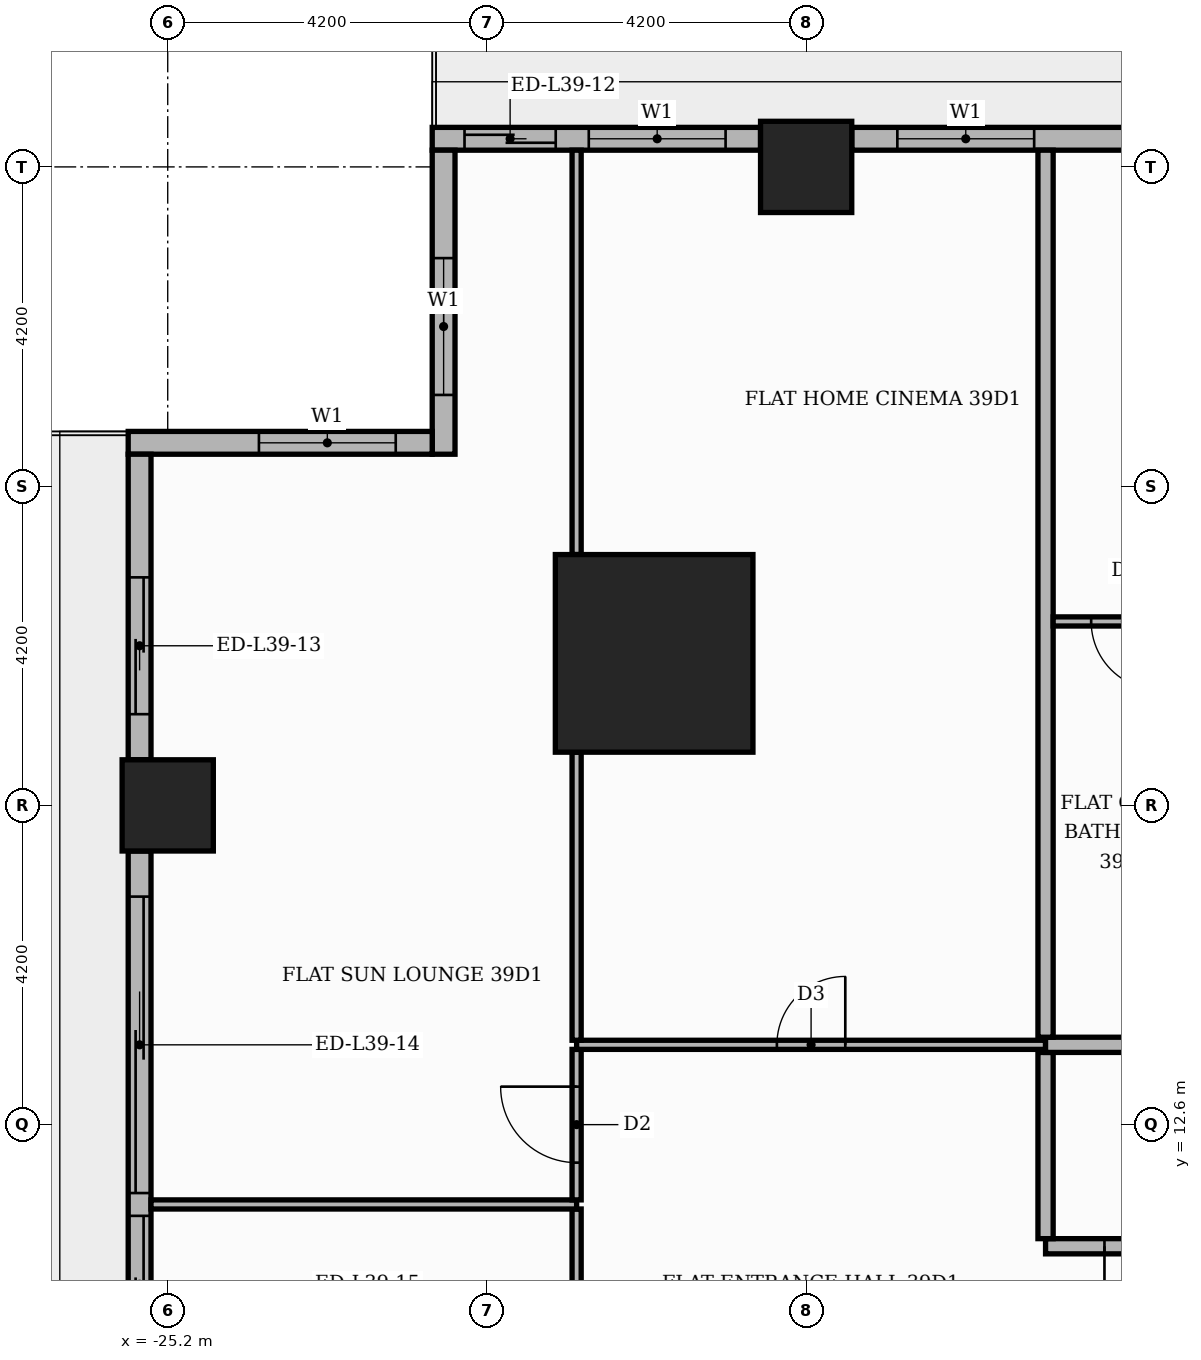
"""IFC4 building model, lengths in metres.
Left out: names, types, materials, properties, quantities, classifications, styles, units other than length and angle.
Written with IfcOpenShell. Run it as: python <this file> out.ifc"""

import sys

from ifc_helpers import new_model, si_unit, direction, frame, frame_2d, origin, origin_2d, place, context, subcontext, project, spatial, rectangle, extrude, element, fill, save


model = new_model("IFC4")
c1 = context("Model", 3, precision=1e-05, world=origin(), true_north=direction((0.0, 1.0)))
c2 = subcontext(c1, "Body", "Model", "MODEL_VIEW")
j1 = project(units=[si_unit("LENGTHUNIT", "METRE"), si_unit("PLANEANGLEUNIT", "RADIAN")], contexts=[c1])
p1 = place(None, origin())
s1 = spatial("IfcSite", under=j1, at=p1, CompositionType="ELEMENT")
p2 = place(p1, origin())
s2 = spatial("IfcBuilding", under=s1, at=p2, CompositionType="ELEMENT")
p3 = place(p2, frame((0.0, 0.0, 165.0)))
s3 = spatial("IfcBuildingStorey", under=s2, at=p3, CompositionType="ELEMENT", Elevation=165.0)
p4 = place(p3, frame((-18.8, 18.8, 0.0), z_axis=(0.0, 0.0, 1.0), x_axis=(1.0, 0.0, 0.0)))
e1 = element("IfcColumn", 1, at=p4, inside=s3, PredefinedType="COLUMN", context=c2, shape_type="SweptSolid", body=[
    extrude(rectangle(XDim=2.6, YDim=2.6, at=origin_2d()), origin(), (0.0, 0.0, 1.0), 3.9),
])
for number, where, z_axis, x_axis in (
    (2, (-16.8, 25.2, 0.0), (0.0, 0.0, 1.0), (1.0, 0.0, 0.0)),
    (3, (-25.2, 16.8, 0.0), (0.0, 0.0, 1.0), (1.0, 0.0, 0.0)),
):
    element("IfcColumn", number, at=place(p3, frame(where, z_axis=z_axis, x_axis=x_axis)), inside=s3, PredefinedType="COLUMN", context=c2, shape_type="SweptSolid", body=[
        extrude(rectangle(XDim=1.2, YDim=1.2, at=origin_2d()), origin(), (0.0, 0.0, 1.0), 3.9),
    ])
p5 = place(p3, frame((-11.85, 25.57, 0.0), z_axis=(0.0, 0.0, 1.0), x_axis=(-1.0, 0.0, 0.0)))
e4 = element("IfcWall", 4, at=p5, inside=s3, PredefinedType="STANDARD", context=c2, shape_type="SweptSolid", body=[
    extrude(rectangle(XDim=4.35, YDim=0.3, at=frame_2d((2.175, 0.0))), origin(), (0.0, 0.0, 1.0), 3.48),
])
p6 = place(p5, frame((1.95, 0.0, 0.9)))
e5 = element("IfcOpeningElement", 5, at=p6, cuts=e4, PredefinedType="OPENING", context=c2, shape_type="SweptSolid", body=[
    extrude(rectangle(XDim=1.8, YDim=2.1, at=frame_2d((0.9, 1.05))), frame((0.0, 0.16, 0.0), z_axis=(0.0, -1.0, 0.0), x_axis=(1.0, 0.0, 0.0)), (0.0, 0.0, 1.0), 0.32),
])
p7 = place(p3, frame((-17.4, 25.57, 0.0), z_axis=(0.0, 0.0, 1.0), x_axis=(-1.0, 0.0, 0.0)))
e6 = element("IfcWall", 6, at=p7, inside=s3, PredefinedType="STANDARD", context=c2, shape_type="SweptSolid", body=[
    extrude(rectangle(XDim=4.32, YDim=0.3, at=frame_2d((2.16, 0.0))), origin(), (0.0, 0.0, 1.0), 3.48),
])
p8 = place(p7, frame((2.695, 0.0, 0.0)))
e7 = element("IfcOpeningElement", 7, at=p8, cuts=e6, PredefinedType="OPENING", context=c2, shape_type="SweptSolid", body=[
    extrude(rectangle(XDim=1.2, YDim=2.4, at=frame_2d((0.6, 1.2))), frame((0.0, 0.16, 0.0), z_axis=(0.0, -1.0, 0.0), x_axis=(1.0, 0.0, 0.0)), (0.0, 0.0, 1.0), 0.32),
])
p9 = place(p7, frame((0.46, 0.0, 0.9)))
e8 = element("IfcOpeningElement", 8, at=p9, cuts=e6, PredefinedType="OPENING", context=c2, shape_type="SweptSolid", body=[
    extrude(rectangle(XDim=1.8, YDim=2.1, at=frame_2d((0.9, 1.05))), frame((0.0, 0.16, 0.0), z_axis=(0.0, -1.0, 0.0), x_axis=(1.0, 0.0, 0.0)), (0.0, 0.0, 1.0), 0.32),
])
p10 = place(p3, frame((-21.57, 25.42, 0.0), z_axis=(0.0, 0.0, 1.0), x_axis=(0.0, -1.0, 0.0)))
e9 = element("IfcWall", 9, at=p10, inside=s3, PredefinedType="STANDARD", context=c2, shape_type="SweptSolid", body=[
    extrude(rectangle(XDim=4.0, YDim=0.3, at=frame_2d((2.0, 0.0))), origin(), (0.0, 0.0, 1.0), 3.48),
])
p11 = place(p10, frame((1.42, 0.0, 0.9)))
e10 = element("IfcOpeningElement", 10, at=p11, cuts=e9, PredefinedType="OPENING", context=c2, shape_type="SweptSolid", body=[
    extrude(rectangle(XDim=1.8, YDim=2.1, at=frame_2d((0.9, 1.05))), frame((0.0, 0.16, 0.0), z_axis=(0.0, -1.0, 0.0), x_axis=(1.0, 0.0, 0.0)), (0.0, 0.0, 1.0), 0.32),
])
p12 = place(p3, frame((-21.72, 21.57, 0.0), z_axis=(0.0, 0.0, 1.0), x_axis=(-1.0, 0.0, 0.0)))
e11 = element("IfcWall", 11, at=p12, inside=s3, PredefinedType="STANDARD", context=c2, shape_type="SweptSolid", body=[
    extrude(rectangle(XDim=4.0, YDim=0.3, at=frame_2d((2.0, 0.0))), origin(), (0.0, 0.0, 1.0), 3.48),
])
p13 = place(p12, frame((0.48, 0.0, 0.9)))
e12 = element("IfcOpeningElement", 12, at=p13, cuts=e11, PredefinedType="OPENING", context=c2, shape_type="SweptSolid", body=[
    extrude(rectangle(XDim=1.8, YDim=2.1, at=frame_2d((0.9, 1.05))), frame((0.0, 0.16, 0.0), z_axis=(0.0, -1.0, 0.0), x_axis=(1.0, 0.0, 0.0)), (0.0, 0.0, 1.0), 0.32),
])
p14 = place(p3, frame((-25.57, 21.42, 0.0), z_axis=(0.0, 0.0, 1.0), x_axis=(0.0, -1.0, 0.0)))
e13 = element("IfcWall", 13, at=p14, inside=s3, PredefinedType="STANDARD", context=c2, shape_type="SweptSolid", body=[
    extrude(rectangle(XDim=4.02, YDim=0.3, at=frame_2d((2.01, 0.0))), origin(), (0.0, 0.0, 1.0), 3.48),
])
p15 = place(p14, frame((1.62, 0.0, 0.0)))
e14 = element("IfcOpeningElement", 14, at=p15, cuts=e13, PredefinedType="OPENING", context=c2, shape_type="SweptSolid", body=[
    extrude(rectangle(XDim=1.8, YDim=2.4, at=frame_2d((0.9, 1.2))), frame((0.0, 0.16, 0.0), z_axis=(0.0, -1.0, 0.0), x_axis=(1.0, 0.0, 0.0)), (0.0, 0.0, 1.0), 0.32),
])
p16 = place(p3, frame((-25.57, 16.2, 0.0), z_axis=(0.0, 0.0, 1.0), x_axis=(0.0, -1.0, 0.0)))
e15 = element("IfcWall", 15, at=p16, inside=s3, PredefinedType="STANDARD", context=c2, shape_type="SweptSolid", body=[
    extrude(rectangle(XDim=7.2, YDim=0.3, at=frame_2d((3.6, 0.0))), origin(), (0.0, 0.0, 1.0), 3.48),
])
p17 = place(p16, frame((0.6, 0.0, 0.0)))
e16 = element("IfcOpeningElement", 16, at=p17, cuts=e15, PredefinedType="OPENING", context=c2, shape_type="SweptSolid", body=[
    extrude(rectangle(XDim=3.9, YDim=2.4, at=frame_2d((1.95, 1.2))), frame((0.0, 0.16, 0.0), z_axis=(0.0, -1.0, 0.0), x_axis=(1.0, 0.0, 0.0)), (0.0, 0.0, 1.0), 0.32),
])
p18 = place(p16, frame((4.8, 0.0, 0.0)))
e17 = element("IfcOpeningElement", 17, at=p18, cuts=e15, PredefinedType="OPENING", context=c2, shape_type="SweptSolid", body=[
    extrude(rectangle(XDim=1.8, YDim=2.4, at=frame_2d((0.9, 1.2))), frame((0.0, 0.16, 0.0), z_axis=(0.0, -1.0, 0.0), x_axis=(1.0, 0.0, 0.0)), (0.0, 0.0, 1.0), 0.32),
])
p19 = place(p3, frame((-19.82, 3.21, 0.0), z_axis=(0.0, 0.0, 1.0), x_axis=(0.0, 1.0, 0.0)))
e18 = element("IfcWall", 18, at=p19, inside=s3, PredefinedType="PARTITIONING", context=c2, shape_type="SweptSolid", body=[
    extrude(rectangle(XDim=8.28, YDim=0.12, at=frame_2d((4.14, 0.0))), origin(), (0.0, 0.0, 1.0), 3.48),
])
p20 = place(p19, frame((3.64, 0.0, 0.0)))
e19 = element("IfcOpeningElement", 19, at=p20, cuts=e18, PredefinedType="OPENING", context=c2, shape_type="SweptSolid", body=[
    extrude(rectangle(XDim=1.0, YDim=2.1, at=frame_2d((0.5, 1.05))), frame((0.0, 0.07, 0.0), z_axis=(0.0, -1.0, 0.0), x_axis=(1.0, 0.0, 0.0)), (0.0, 0.0, 1.0), 0.14),
])
p21 = place(p3, frame((-13.65, 11.0, 0.0), z_axis=(0.0, 0.0, 1.0), x_axis=(1.0, 0.0, 0.0)))
e20 = element("IfcWall", 20, at=p21, inside=s3, PredefinedType="PARTITIONING", context=c2, shape_type="SweptSolid", body=[
    extrude(rectangle(XDim=2.65, YDim=0.2, at=frame_2d((1.325, 0.0))), origin(), (0.0, 0.0, 1.0), 3.48),
])
p22 = place(p21, frame((0.775, 0.0, 0.0)))
e21 = element("IfcOpeningElement", 21, at=p22, cuts=e20, PredefinedType="OPENING", context=c2, shape_type="SweptSolid", body=[
    extrude(rectangle(XDim=1.1, YDim=2.4, at=frame_2d((0.55, 1.2))), frame((0.0, 0.11, 0.0), z_axis=(0.0, -1.0, 0.0), x_axis=(1.0, 0.0, 0.0)), (0.0, 0.0, 1.0), 0.22),
])
p23 = place(p3, frame((-13.65, 11.1, 0.0), z_axis=(0.0, 0.0, 1.0), x_axis=(0.0, 1.0, 0.0)))
e22 = element("IfcWall", 22, at=p23, inside=s3, PredefinedType="PARTITIONING", context=c2, shape_type="SweptSolid", body=[
    extrude(rectangle(XDim=2.45, YDim=0.2, at=frame_2d((1.225, 0.0))), origin(), (0.0, 0.0, 1.0), 3.48),
])
p24 = place(p3, frame((-25.42, 11.55, 0.0), z_axis=(0.0, 0.0, 1.0), x_axis=(1.0, 0.0, 0.0)))
e23 = element("IfcWall", 23, at=p24, inside=s3, PredefinedType="PARTITIONING", context=c2, shape_type="SweptSolid", body=[
    extrude(rectangle(XDim=5.6, YDim=0.12, at=frame_2d((2.8, 0.0))), origin(), (0.0, 0.0, 1.0), 3.48),
])
p25 = place(p3, frame((-19.82, 11.61, 0.0), z_axis=(0.0, 0.0, 1.0), x_axis=(0.0, 1.0, 0.0)))
e24 = element("IfcWall", 24, at=p25, inside=s3, PredefinedType="PARTITIONING", context=c2, shape_type="SweptSolid", body=[
    extrude(rectangle(XDim=1.98, YDim=0.12, at=frame_2d((0.99, 0.0))), origin(), (0.0, 0.0, 1.0), 3.48),
])
p26 = place(p25, frame((0.49, 0.0, 0.0)))
e25 = element("IfcOpeningElement", 25, at=p26, cuts=e24, PredefinedType="OPENING", context=c2, shape_type="SweptSolid", body=[
    extrude(rectangle(XDim=1.0, YDim=2.1, at=frame_2d((0.5, 1.05))), frame((0.0, 0.07, 0.0), z_axis=(0.0, -1.0, 0.0), x_axis=(1.0, 0.0, 0.0)), (0.0, 0.0, 1.0), 0.14),
])
p27 = place(p3, frame((-19.82, 13.65, 0.0), z_axis=(0.0, 0.0, 1.0), x_axis=(1.0, 0.0, 0.0)))
e26 = element("IfcWall", 26, at=p27, inside=s3, PredefinedType="PARTITIONING", context=c2, shape_type="SweptSolid", body=[
    extrude(rectangle(XDim=6.17, YDim=0.12, at=frame_2d((3.085, 0.0))), origin(), (0.0, 0.0, 1.0), 3.48),
])
p28 = place(p27, frame((2.635, 0.0, 0.0)))
e27 = element("IfcOpeningElement", 27, at=p28, cuts=e26, PredefinedType="OPENING", context=c2, shape_type="SweptSolid", body=[
    extrude(rectangle(XDim=0.9, YDim=2.1, at=frame_2d((0.45, 1.05))), frame((0.0, 0.07, 0.0), z_axis=(0.0, -1.0, 0.0), x_axis=(1.0, 0.0, 0.0)), (0.0, 0.0, 1.0), 0.14),
])
p29 = place(p3, frame((-13.65, 13.65, 0.0), z_axis=(0.0, 0.0, 1.0), x_axis=(1.0, 0.0, 0.0)))
e28 = element("IfcWall", 28, at=p29, inside=s3, PredefinedType="PARTITIONING", context=c2, shape_type="SweptSolid", body=[
    extrude(rectangle(XDim=32.87, YDim=0.2, at=frame_2d((16.435, 0.0))), origin(), (0.0, 0.0, 1.0), 3.48),
])
p30 = place(p29, frame((24.65, 0.0, 0.0)))
e29 = element("IfcOpeningElement", 29, at=p30, cuts=e28, PredefinedType="OPENING", context=c2, shape_type="SweptSolid", body=[
    extrude(rectangle(XDim=1.1, YDim=2.4, at=frame_2d((0.55, 1.2))), frame((0.0, 0.11, 0.0), z_axis=(0.0, -1.0, 0.0), x_axis=(1.0, 0.0, 0.0)), (0.0, 0.0, 1.0), 0.22),
])
p31 = place(p29, frame((12.05, 0.0, 0.0)))
e30 = element("IfcOpeningElement", 30, at=p31, cuts=e28, PredefinedType="OPENING", context=c2, shape_type="SweptSolid", body=[
    extrude(rectangle(XDim=1.1, YDim=2.4, at=frame_2d((0.55, 1.2))), frame((0.0, 0.11, 0.0), z_axis=(0.0, -1.0, 0.0), x_axis=(1.0, 0.0, 0.0)), (0.0, 0.0, 1.0), 0.22),
])
p32 = place(p3, frame((-19.82, 13.71, 0.0), z_axis=(0.0, 0.0, 1.0), x_axis=(0.0, 1.0, 0.0)))
e31 = element("IfcWall", 31, at=p32, inside=s3, PredefinedType="PARTITIONING", context=c2, shape_type="SweptSolid", body=[
    extrude(rectangle(XDim=3.79, YDim=0.12, at=frame_2d((1.895, 0.0))), origin(), (0.0, 0.0, 1.0), 3.48),
])
p33 = place(p3, frame((-13.65, 13.75, 0.0), z_axis=(0.0, 0.0, 1.0), x_axis=(0.0, 1.0, 0.0)))
e32 = element("IfcWall", 32, at=p33, inside=s3, PredefinedType="PARTITIONING", context=c2, shape_type="SweptSolid", body=[
    extrude(rectangle(XDim=11.67, YDim=0.2, at=frame_2d((5.835, 0.0))), origin(), (0.0, 0.0, 1.0), 3.48),
])
p34 = place(p3, frame((-13.55, 19.22, 0.0), z_axis=(0.0, 0.0, 1.0), x_axis=(1.0, 0.0, 0.0)))
e33 = element("IfcWall", 33, at=p34, inside=s3, PredefinedType="PARTITIONING", context=c2, shape_type="SweptSolid", body=[
    extrude(rectangle(XDim=10.4, YDim=0.12, at=frame_2d((5.2, 0.0))), origin(), (0.0, 0.0, 1.0), 3.48),
])
p35 = place(p34, frame((6.8, 0.0, 0.0)))
e34 = element("IfcOpeningElement", 34, at=p35, cuts=e33, PredefinedType="OPENING", context=c2, shape_type="SweptSolid", body=[
    extrude(rectangle(XDim=0.9, YDim=2.1, at=frame_2d((0.45, 1.05))), frame((0.0, 0.07, 0.0), z_axis=(0.0, -1.0, 0.0), x_axis=(1.0, 0.0, 0.0)), (0.0, 0.0, 1.0), 0.14),
])
p36 = place(p34, frame((2.55, 0.0, 0.0)))
e35 = element("IfcOpeningElement", 35, at=p36, cuts=e33, PredefinedType="OPENING", context=c2, shape_type="SweptSolid", body=[
    extrude(rectangle(XDim=1.0, YDim=2.1, at=frame_2d((0.5, 1.05))), frame((0.0, 0.07, 0.0), z_axis=(0.0, -1.0, 0.0), x_axis=(1.0, 0.0, 0.0)), (0.0, 0.0, 1.0), 0.14),
])
p37 = place(p34, frame((0.5, 0.0, 0.0)))
e36 = element("IfcOpeningElement", 36, at=p37, cuts=e33, PredefinedType="OPENING", context=c2, shape_type="SweptSolid", body=[
    extrude(rectangle(XDim=0.9, YDim=2.1, at=frame_2d((0.45, 1.05))), frame((0.0, 0.07, 0.0), z_axis=(0.0, -1.0, 0.0), x_axis=(1.0, 0.0, 0.0)), (0.0, 0.0, 1.0), 0.14),
])
p38 = place(p3, frame((-19.82, 20.1, 0.0), z_axis=(0.0, 0.0, 1.0), x_axis=(0.0, 1.0, 0.0)))
e37 = element("IfcWall", 37, at=p38, inside=s3, PredefinedType="PARTITIONING", context=c2, shape_type="SweptSolid", body=[
    extrude(rectangle(XDim=5.32, YDim=0.12, at=frame_2d((2.66, 0.0))), origin(), (0.0, 0.0, 1.0), 3.48),
])
p39 = place(p6, origin())
e38 = element("IfcWindow", 38, at=p39, inside=s3, PartitioningType="SINGLE_PANEL", PredefinedType="WINDOW", context=c2, shape_type="SweptSolid", body=[
    extrude(rectangle(XDim=1.8, YDim=2.1, at=frame_2d((0.9, 1.05))), frame((0.0, 0.03, 0.0), z_axis=(0.0, -1.0, 0.0), x_axis=(1.0, 0.0, 0.0)), (0.0, 0.0, 1.0), 0.06),
])
fill(e5, e38)
p40 = place(p8, origin())
e39 = element("IfcDoor", 39, at=p40, inside=s3, OperationType="SLIDING_TO_LEFT", PredefinedType="DOOR", context=c2, shape_type="SweptSolid", body=[
    extrude(rectangle(XDim=1.2, YDim=2.4, at=frame_2d((0.6, 1.2))), frame((0.0, 0.025, 0.0), z_axis=(0.0, -1.0, 0.0), x_axis=(1.0, 0.0, 0.0)), (0.0, 0.0, 1.0), 0.05),
])
fill(e7, e39)
p41 = place(p9, origin())
e40 = element("IfcWindow", 40, at=p41, inside=s3, PartitioningType="SINGLE_PANEL", PredefinedType="WINDOW", context=c2, shape_type="SweptSolid", body=[
    extrude(rectangle(XDim=1.8, YDim=2.1, at=frame_2d((0.9, 1.05))), frame((0.0, 0.03, 0.0), z_axis=(0.0, -1.0, 0.0), x_axis=(1.0, 0.0, 0.0)), (0.0, 0.0, 1.0), 0.06),
])
fill(e8, e40)
p42 = place(p11, origin())
e41 = element("IfcWindow", 41, at=p42, inside=s3, PartitioningType="SINGLE_PANEL", PredefinedType="WINDOW", context=c2, shape_type="SweptSolid", body=[
    extrude(rectangle(XDim=1.8, YDim=2.1, at=frame_2d((0.9, 1.05))), frame((0.0, 0.03, 0.0), z_axis=(0.0, -1.0, 0.0), x_axis=(1.0, 0.0, 0.0)), (0.0, 0.0, 1.0), 0.06),
])
fill(e10, e41)
p43 = place(p13, origin())
e42 = element("IfcWindow", 42, at=p43, inside=s3, PartitioningType="SINGLE_PANEL", PredefinedType="WINDOW", context=c2, shape_type="SweptSolid", body=[
    extrude(rectangle(XDim=1.8, YDim=2.1, at=frame_2d((0.9, 1.05))), frame((0.0, 0.03, 0.0), z_axis=(0.0, -1.0, 0.0), x_axis=(1.0, 0.0, 0.0)), (0.0, 0.0, 1.0), 0.06),
])
fill(e12, e42)
p44 = place(p15, origin())
e43 = element("IfcDoor", 43, at=p44, inside=s3, OperationType="SLIDING_TO_RIGHT", PredefinedType="DOOR", context=c2, shape_type="SweptSolid", body=[
    extrude(rectangle(XDim=1.8, YDim=2.4, at=frame_2d((0.9, 1.2))), frame((0.0, 0.025, 0.0), z_axis=(0.0, -1.0, 0.0), x_axis=(1.0, 0.0, 0.0)), (0.0, 0.0, 1.0), 0.05),
])
fill(e14, e43)
p45 = place(p17, origin())
e44 = element("IfcDoor", 44, at=p45, inside=s3, OperationType="SLIDING_TO_LEFT", PredefinedType="DOOR", context=c2, shape_type="SweptSolid", body=[
    extrude(rectangle(XDim=3.9, YDim=2.4, at=frame_2d((1.95, 1.2))), frame((0.0, 0.025, 0.0), z_axis=(0.0, -1.0, 0.0), x_axis=(1.0, 0.0, 0.0)), (0.0, 0.0, 1.0), 0.05),
])
fill(e16, e44)
p46 = place(p18, origin())
e45 = element("IfcDoor", 45, at=p46, inside=s3, OperationType="SLIDING_TO_RIGHT", PredefinedType="DOOR", context=c2, shape_type="SweptSolid", body=[
    extrude(rectangle(XDim=1.8, YDim=2.4, at=frame_2d((0.9, 1.2))), frame((0.0, 0.025, 0.0), z_axis=(0.0, -1.0, 0.0), x_axis=(1.0, 0.0, 0.0)), (0.0, 0.0, 1.0), 0.05),
])
fill(e17, e45)
p47 = place(p37, frame((0.9, 0.0, 0.0), z_axis=(0.0, 0.0, 1.0), x_axis=(-1.0, 0.0, 0.0)))
e46 = element("IfcDoor", 46, at=p47, inside=s3, OperationType="SINGLE_SWING_RIGHT", PredefinedType="DOOR", context=c2, shape_type="SweptSolid", body=[
    extrude(rectangle(XDim=0.9, YDim=2.1, at=frame_2d((0.45, 1.05))), frame((0.0, 0.025, 0.0), z_axis=(0.0, -1.0, 0.0), x_axis=(1.0, 0.0, 0.0)), (0.0, 0.0, 1.0), 0.05),
])
fill(e36, e46)
p48 = place(p22, frame((1.1, 0.0, 0.0), z_axis=(0.0, 0.0, 1.0), x_axis=(-1.0, 0.0, 0.0)))
e47 = element("IfcDoor", 47, at=p48, inside=s3, OperationType="SINGLE_SWING_LEFT", PredefinedType="DOOR", context=c2, shape_type="SweptSolid", body=[
    extrude(rectangle(XDim=1.1, YDim=2.4, at=frame_2d((0.55, 1.2))), frame((0.0, 0.025, 0.0), z_axis=(0.0, -1.0, 0.0), x_axis=(1.0, 0.0, 0.0)), (0.0, 0.0, 1.0), 0.05),
])
fill(e21, e47)
p49 = place(p28, origin())
e48 = element("IfcDoor", 48, at=p49, inside=s3, OperationType="SINGLE_SWING_RIGHT", PredefinedType="DOOR", context=c2, shape_type="SweptSolid", body=[
    extrude(rectangle(XDim=0.9, YDim=2.1, at=frame_2d((0.45, 1.05))), frame((0.0, 0.025, 0.0), z_axis=(0.0, -1.0, 0.0), x_axis=(1.0, 0.0, 0.0)), (0.0, 0.0, 1.0), 0.05),
])
fill(e27, e48)
p50 = place(p26, origin())
e49 = element("IfcDoor", 49, at=p50, inside=s3, OperationType="SINGLE_SWING_RIGHT", PredefinedType="DOOR", context=c2, shape_type="SweptSolid", body=[
    extrude(rectangle(XDim=1.0, YDim=2.1, at=frame_2d((0.5, 1.05))), frame((0.0, 0.025, 0.0), z_axis=(0.0, -1.0, 0.0), x_axis=(1.0, 0.0, 0.0)), (0.0, 0.0, 1.0), 0.05),
])
fill(e25, e49)
save(model, sys.argv[1])
